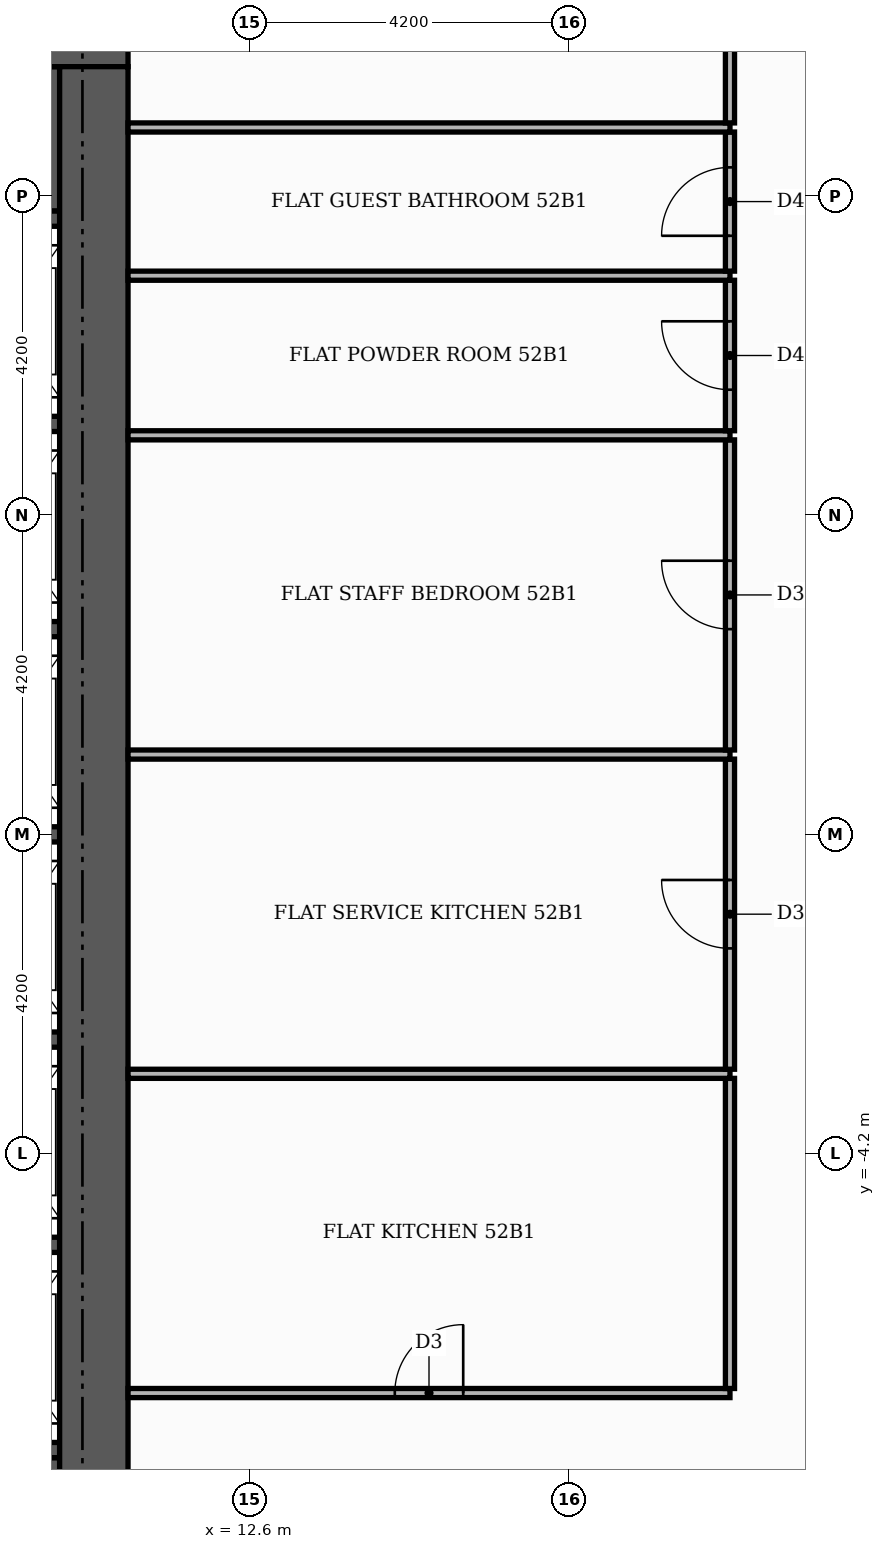
"""IFC4 building model, lengths in metres.
Left out: names, types, materials, properties, quantities, classifications, styles, units other than length and angle.
Written with IfcOpenShell. Run it as: python <this file> out.ifc"""

import sys

from ifc_helpers import new_model, si_unit, direction, frame, frame_2d, origin, place, context, subcontext, project, spatial, rectangle, extrude, element, fill, save


model = new_model("IFC4")
c1 = context("Model", 3, precision=1e-05, world=origin(), true_north=direction((0.0, 1.0)))
c2 = subcontext(c1, "Body", "Model", "MODEL_VIEW")
j1 = project(units=[si_unit("LENGTHUNIT", "METRE"), si_unit("PLANEANGLEUNIT", "RADIAN")], contexts=[c1])
p1 = place(None, origin())
s1 = spatial("IfcSite", under=j1, at=p1, CompositionType="ELEMENT")
p2 = place(p1, origin())
s2 = spatial("IfcBuilding", under=s1, at=p2, CompositionType="ELEMENT")
p3 = place(p2, frame((0.0, 0.0, 219.6)))
s3 = spatial("IfcBuildingStorey", under=s2, at=p3, CompositionType="ELEMENT", Elevation=219.6)
for number, where, z_axis, x_axis in (
    (1, (5.5, -9.15, 0.0), (0.0, 0.0, 1.0), (1.0, 0.0, 0.0)),
    (2, (5.5, 9.15, 0.0), (0.0, 0.0, 1.0), (1.0, 0.0, 0.0)),
):
    element("IfcWall", number, at=place(p3, frame(where, z_axis=z_axis, x_axis=x_axis)), inside=s3, PredefinedType="SHEAR", context=c2, shape_type="SweptSolid", body=[
        extrude(rectangle(XDim=4.6, YDim=1.9, at=frame_2d((2.3, 0.0))), origin(), (0.0, 0.0, 1.0), 3.48),
    ])
for number, where, z_axis, x_axis in (
    (3, (8.1, -8.1, 0.0), (0.0, 0.0, 1.0), (1.0, 0.0, 0.0)),
    (4, (8.1, -5.4, 0.0), (0.0, 0.0, 1.0), (1.0, 0.0, 0.0)),
    (5, (8.1, -2.7, 0.0), (0.0, 0.0, 1.0), (1.0, 0.0, 0.0)),
    (6, (8.1, 0.0, 0.0), (0.0, 0.0, 1.0), (1.0, 0.0, 0.0)),
    (7, (8.1, 2.7, 0.0), (0.0, 0.0, 1.0), (1.0, 0.0, 0.0)),
    (8, (8.1, 5.4, 0.0), (0.0, 0.0, 1.0), (1.0, 0.0, 0.0)),
    (9, (8.1, 8.1, 0.0), (0.0, 0.0, 1.0), (1.0, 0.0, 0.0)),
):
    element("IfcWall", number, at=place(p3, frame(where, z_axis=z_axis, x_axis=x_axis)), inside=s3, PredefinedType="SHEAR", context=c2, shape_type="SweptSolid", body=[
        extrude(rectangle(XDim=2.0, YDim=0.2, at=frame_2d((1.0, 0.0))), origin(), (0.0, 0.0, 1.0), 3.48),
    ])
p4 = place(p3, frame((-11.0, 10.55, 0.0), z_axis=(0.0, 0.0, 1.0), x_axis=(1.0, 0.0, 0.0)))
e10 = element("IfcWall", 10, at=p4, inside=s3, PredefinedType="SHEAR", context=c2, shape_type="SweptSolid", body=[
    extrude(rectangle(XDim=22.0, YDim=0.9, at=frame_2d((11.0, 0.0))), origin(), (0.0, 0.0, 1.0), 3.48),
])
p5 = place(p4, frame((13.3, 0.0, 0.0)))
e11 = element("IfcOpeningElement", 11, at=p5, cuts=e10, PredefinedType="OPENING", context=c2, shape_type="SweptSolid", body=[
    extrude(rectangle(XDim=1.8, YDim=2.2, at=frame_2d((0.9, 1.1))), frame((0.0, 0.46, 0.0), z_axis=(0.0, -1.0, 0.0), x_axis=(1.0, 0.0, 0.0)), (0.0, 0.0, 1.0), 0.92),
])
p6 = place(p3, frame((10.55, -10.1, 0.0), z_axis=(0.0, 0.0, 1.0), x_axis=(0.0, 1.0, 0.0)))
e12 = element("IfcWall", 12, at=p6, inside=s3, PredefinedType="SHEAR", context=c2, shape_type="SweptSolid", body=[
    extrude(rectangle(XDim=20.2, YDim=0.9, at=frame_2d((10.1, 0.0))), origin(), (0.0, 0.0, 1.0), 3.48),
])
p7 = place(p3, frame((11.0, -7.35, 0.0), z_axis=(0.0, 0.0, 1.0), x_axis=(1.0, 0.0, 0.0)))
e13 = element("IfcWall", 13, at=p7, inside=s3, PredefinedType="PARTITIONING", context=c2, shape_type="SweptSolid", body=[
    extrude(rectangle(XDim=7.92, YDim=0.12, at=frame_2d((3.96, 0.0))), origin(), (0.0, 0.0, 1.0), 3.48),
])
p8 = place(p7, frame((3.51, 0.0, 0.0)))
e14 = element("IfcOpeningElement", 14, at=p8, cuts=e13, PredefinedType="OPENING", context=c2, shape_type="SweptSolid", body=[
    extrude(rectangle(XDim=0.9, YDim=2.1, at=frame_2d((0.45, 1.05))), frame((0.0, 0.07, 0.0), z_axis=(0.0, -1.0, 0.0), x_axis=(1.0, 0.0, 0.0)), (0.0, 0.0, 1.0), 0.14),
])
p9 = place(p3, frame((18.92, -7.29, 0.0), z_axis=(0.0, 0.0, 1.0), x_axis=(0.0, 1.0, 0.0)))
e15 = element("IfcWall", 15, at=p9, inside=s3, PredefinedType="PARTITIONING", context=c2, shape_type="SweptSolid", body=[
    extrude(rectangle(XDim=4.08, YDim=0.12, at=frame_2d((2.04, 0.0))), origin(), (0.0, 0.0, 1.0), 3.48),
])
p10 = place(p3, frame((11.0, -3.15, 0.0), z_axis=(0.0, 0.0, 1.0), x_axis=(1.0, 0.0, 0.0)))
e16 = element("IfcWall", 16, at=p10, inside=s3, PredefinedType="PARTITIONING", context=c2, shape_type="SweptSolid", body=[
    extrude(rectangle(XDim=7.92, YDim=0.12, at=frame_2d((3.96, 0.0))), origin(), (0.0, 0.0, 1.0), 3.48),
])
p11 = place(p3, frame((18.92, -3.09, 0.0), z_axis=(0.0, 0.0, 1.0), x_axis=(0.0, 1.0, 0.0)))
e17 = element("IfcWall", 17, at=p11, inside=s3, PredefinedType="PARTITIONING", context=c2, shape_type="SweptSolid", body=[
    extrude(rectangle(XDim=4.08, YDim=0.12, at=frame_2d((2.04, 0.0))), origin(), (0.0, 0.0, 1.0), 3.48),
])
p12 = place(p11, frame((1.59, 0.0, 0.0)))
e18 = element("IfcOpeningElement", 18, at=p12, cuts=e17, PredefinedType="OPENING", context=c2, shape_type="SweptSolid", body=[
    extrude(rectangle(XDim=0.9, YDim=2.1, at=frame_2d((0.45, 1.05))), frame((0.0, 0.07, 0.0), z_axis=(0.0, -1.0, 0.0), x_axis=(1.0, 0.0, 0.0)), (0.0, 0.0, 1.0), 0.14),
])
p13 = place(p3, frame((11.0, 1.05, 0.0), z_axis=(0.0, 0.0, 1.0), x_axis=(1.0, 0.0, 0.0)))
e19 = element("IfcWall", 19, at=p13, inside=s3, PredefinedType="PARTITIONING", context=c2, shape_type="SweptSolid", body=[
    extrude(rectangle(XDim=7.92, YDim=0.12, at=frame_2d((3.96, 0.0))), origin(), (0.0, 0.0, 1.0), 3.48),
])
p14 = place(p3, frame((18.92, 1.11, 0.0), z_axis=(0.0, 0.0, 1.0), x_axis=(0.0, 1.0, 0.0)))
e20 = element("IfcWall", 20, at=p14, inside=s3, PredefinedType="PARTITIONING", context=c2, shape_type="SweptSolid", body=[
    extrude(rectangle(XDim=4.08, YDim=0.12, at=frame_2d((2.04, 0.0))), origin(), (0.0, 0.0, 1.0), 3.48),
])
p15 = place(p14, frame((1.59, 0.0, 0.0)))
e21 = element("IfcOpeningElement", 21, at=p15, cuts=e20, PredefinedType="OPENING", context=c2, shape_type="SweptSolid", body=[
    extrude(rectangle(XDim=0.9, YDim=2.1, at=frame_2d((0.45, 1.05))), frame((0.0, 0.07, 0.0), z_axis=(0.0, -1.0, 0.0), x_axis=(1.0, 0.0, 0.0)), (0.0, 0.0, 1.0), 0.14),
])
p16 = place(p3, frame((11.0, 5.25, 0.0), z_axis=(0.0, 0.0, 1.0), x_axis=(1.0, 0.0, 0.0)))
e22 = element("IfcWall", 22, at=p16, inside=s3, PredefinedType="PARTITIONING", context=c2, shape_type="SweptSolid", body=[
    extrude(rectangle(XDim=7.92, YDim=0.12, at=frame_2d((3.96, 0.0))), origin(), (0.0, 0.0, 1.0), 3.48),
])
p17 = place(p3, frame((18.92, 5.31, 0.0), z_axis=(0.0, 0.0, 1.0), x_axis=(0.0, 1.0, 0.0)))
e23 = element("IfcWall", 23, at=p17, inside=s3, PredefinedType="PARTITIONING", context=c2, shape_type="SweptSolid", body=[
    extrude(rectangle(XDim=1.98, YDim=0.12, at=frame_2d((0.99, 0.0))), origin(), (0.0, 0.0, 1.0), 3.48),
])
p18 = place(p17, frame((0.54, 0.0, 0.0)))
e24 = element("IfcOpeningElement", 24, at=p18, cuts=e23, PredefinedType="OPENING", context=c2, shape_type="SweptSolid", body=[
    extrude(rectangle(XDim=0.9, YDim=2.1, at=frame_2d((0.45, 1.05))), frame((0.0, 0.07, 0.0), z_axis=(0.0, -1.0, 0.0), x_axis=(1.0, 0.0, 0.0)), (0.0, 0.0, 1.0), 0.14),
])
p19 = place(p3, frame((11.0, 7.35, 0.0), z_axis=(0.0, 0.0, 1.0), x_axis=(1.0, 0.0, 0.0)))
e25 = element("IfcWall", 25, at=p19, inside=s3, PredefinedType="PARTITIONING", context=c2, shape_type="SweptSolid", body=[
    extrude(rectangle(XDim=7.92, YDim=0.12, at=frame_2d((3.96, 0.0))), origin(), (0.0, 0.0, 1.0), 3.48),
])
p20 = place(p3, frame((18.92, 7.41, 0.0), z_axis=(0.0, 0.0, 1.0), x_axis=(0.0, 1.0, 0.0)))
e26 = element("IfcWall", 26, at=p20, inside=s3, PredefinedType="PARTITIONING", context=c2, shape_type="SweptSolid", body=[
    extrude(rectangle(XDim=1.83, YDim=0.12, at=frame_2d((0.915, 0.0))), origin(), (0.0, 0.0, 1.0), 3.48),
])
p21 = place(p20, frame((0.465, 0.0, 0.0)))
e27 = element("IfcOpeningElement", 27, at=p21, cuts=e26, PredefinedType="OPENING", context=c2, shape_type="SweptSolid", body=[
    extrude(rectangle(XDim=0.9, YDim=2.1, at=frame_2d((0.45, 1.05))), frame((0.0, 0.07, 0.0), z_axis=(0.0, -1.0, 0.0), x_axis=(1.0, 0.0, 0.0)), (0.0, 0.0, 1.0), 0.14),
])
p22 = place(p3, frame((11.0, 9.3, 0.0), z_axis=(0.0, 0.0, 1.0), x_axis=(1.0, 0.0, 0.0)))
e28 = element("IfcWall", 28, at=p22, inside=s3, PredefinedType="PARTITIONING", context=c2, shape_type="SweptSolid", body=[
    extrude(rectangle(XDim=7.92, YDim=0.12, at=frame_2d((3.96, 0.0))), origin(), (0.0, 0.0, 1.0), 3.48),
])
p23 = place(p3, frame((18.92, 9.36, 0.0), z_axis=(0.0, 0.0, 1.0), x_axis=(0.0, 1.0, 0.0)))
e29 = element("IfcWall", 29, at=p23, inside=s3, PredefinedType="PARTITIONING", context=c2, shape_type="SweptSolid", body=[
    extrude(rectangle(XDim=4.19, YDim=0.12, at=frame_2d((2.095, 0.0))), origin(), (0.0, 0.0, 1.0), 3.48),
])
p24 = place(p23, frame((1.665, 0.0, 0.0)))
e30 = element("IfcOpeningElement", 30, at=p24, cuts=e29, PredefinedType="OPENING", context=c2, shape_type="SweptSolid", body=[
    extrude(rectangle(XDim=0.9, YDim=2.1, at=frame_2d((0.45, 1.05))), frame((0.0, 0.07, 0.0), z_axis=(0.0, -1.0, 0.0), x_axis=(1.0, 0.0, 0.0)), (0.0, 0.0, 1.0), 0.14),
])
p25 = place(p8, origin())
e31 = element("IfcDoor", 31, at=p25, inside=s3, OperationType="SINGLE_SWING_RIGHT", PredefinedType="DOOR", context=c2, shape_type="SweptSolid", body=[
    extrude(rectangle(XDim=0.9, YDim=2.1, at=frame_2d((0.45, 1.05))), frame((0.0, 0.025, 0.0), z_axis=(0.0, -1.0, 0.0), x_axis=(1.0, 0.0, 0.0)), (0.0, 0.0, 1.0), 0.05),
])
fill(e14, e31)
p26 = place(p12, origin())
e32 = element("IfcDoor", 32, at=p26, inside=s3, OperationType="SINGLE_SWING_RIGHT", PredefinedType="DOOR", context=c2, shape_type="SweptSolid", body=[
    extrude(rectangle(XDim=0.9, YDim=2.1, at=frame_2d((0.45, 1.05))), frame((0.0, 0.025, 0.0), z_axis=(0.0, -1.0, 0.0), x_axis=(1.0, 0.0, 0.0)), (0.0, 0.0, 1.0), 0.05),
])
fill(e18, e32)
p27 = place(p15, origin())
e33 = element("IfcDoor", 33, at=p27, inside=s3, OperationType="SINGLE_SWING_RIGHT", PredefinedType="DOOR", context=c2, shape_type="SweptSolid", body=[
    extrude(rectangle(XDim=0.9, YDim=2.1, at=frame_2d((0.45, 1.05))), frame((0.0, 0.025, 0.0), z_axis=(0.0, -1.0, 0.0), x_axis=(1.0, 0.0, 0.0)), (0.0, 0.0, 1.0), 0.05),
])
fill(e21, e33)
p28 = place(p18, origin())
e34 = element("IfcDoor", 34, at=p28, inside=s3, OperationType="SINGLE_SWING_RIGHT", PredefinedType="DOOR", context=c2, shape_type="SweptSolid", body=[
    extrude(rectangle(XDim=0.9, YDim=2.1, at=frame_2d((0.45, 1.05))), frame((0.0, 0.025, 0.0), z_axis=(0.0, -1.0, 0.0), x_axis=(1.0, 0.0, 0.0)), (0.0, 0.0, 1.0), 0.05),
])
fill(e24, e34)
p29 = place(p21, origin())
e35 = element("IfcDoor", 35, at=p29, inside=s3, OperationType="SINGLE_SWING_LEFT", PredefinedType="DOOR", context=c2, shape_type="SweptSolid", body=[
    extrude(rectangle(XDim=0.9, YDim=2.1, at=frame_2d((0.45, 1.05))), frame((0.0, 0.025, 0.0), z_axis=(0.0, -1.0, 0.0), x_axis=(1.0, 0.0, 0.0)), (0.0, 0.0, 1.0), 0.05),
])
fill(e27, e35)
save(model, sys.argv[1])
